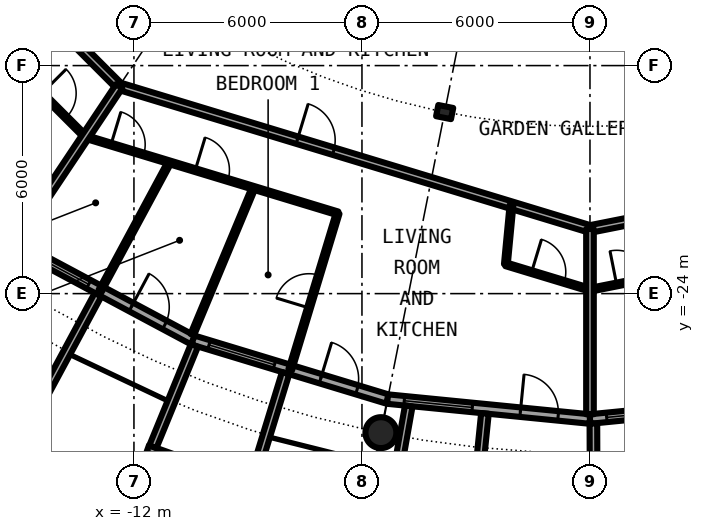
"""IFC4 building model, lengths in metres.
Left out: names, types, materials, properties, quantities, classifications, styles, units other than length and angle.
Written with IfcOpenShell. Run it as: python <this file> out.ifc"""

import sys

from ifc_helpers import new_model, si_unit, direction, frame, frame_2d, origin, origin_2d, place, context, subcontext, project, spatial, rectangle, circle, hollow_circle, i_section, extrude, element, fill, save


model = new_model("IFC4")
c1 = context("Model", 3, precision=1e-05, world=origin(), true_north=direction((0.0, 1.0)))
c2 = subcontext(c1, "Body", "Model", "MODEL_VIEW")
j1 = project(units=[si_unit("LENGTHUNIT", "METRE"), si_unit("PLANEANGLEUNIT", "RADIAN")], contexts=[c1])
p1 = place(None, origin())
s1 = spatial("IfcSite", under=j1, at=p1, CompositionType="ELEMENT")
p2 = place(p1, origin())
s2 = spatial("IfcBuilding", under=s1, at=p2, CompositionType="ELEMENT")
p3 = place(p2, frame((0.0, 0.0, 199.35)))
s3 = spatial("IfcBuildingStorey", under=s2, at=p3, CompositionType="ELEMENT", Elevation=199.35)
p4 = place(p3, frame((-5.501, -27.658, 0.0), z_axis=(0.0, 0.0, 1.0), x_axis=(1.0, 0.0, 0.0)))
e1 = element("IfcColumn", 1, at=p4, inside=s3, PredefinedType="COLUMN", context=c2, shape_type="SweptSolid", body=[
    extrude(hollow_circle(Radius=0.406, WallThickness=0.03, at=origin_2d()), origin(), (0.0, 0.0, 1.0), 3.05),
])
p5 = place(p3, frame((-3.824, -19.223, 0.0), z_axis=(0.0, 0.0, 1.0), x_axis=(-0.195090322016, -0.980785280403, 0.0)))
e2 = element("IfcColumn", 2, at=p5, inside=s3, PredefinedType="COLUMN", context=c2, shape_type="SweptSolid", body=[
    extrude(i_section(OverallWidth=0.3, OverallDepth=0.4, WebThickness=0.013, FlangeThickness=0.024, FilletRadius=0.027, at=origin_2d()), origin(), (0.0, 0.0, 1.0), 3.05),
])
p6 = place(p3, frame((-15.167, -22.699, 0.0), z_axis=(0.0, 0.0, 1.0), x_axis=(0.881915646801, -0.471407246368, 0.0)))
e3 = element("IfcWall", 3, at=p6, inside=s3, PredefinedType="SOLIDWALL", context=c2, shape_type="SweptSolid", body=[
    extrude(rectangle(XDim=5.352, YDim=0.25, at=frame_2d((2.676, 0.0))), origin(), (0.0, 0.0, 1.0), 2.7),
])
p7 = place(p6, frame((0.441, 0.0, 0.3)))
e4 = element("IfcOpeningElement", 4, at=p7, cuts=e3, PredefinedType="OPENING", context=c2, shape_type="SweptSolid", body=[
    extrude(rectangle(XDim=1.8, YDim=2.1, at=frame_2d((0.9, 1.05))), frame((0.0, 0.135, 0.0), z_axis=(0.0, -1.0, 0.0), x_axis=(1.0, 0.0, 0.0)), (0.0, 0.0, 1.0), 0.27),
])
p8 = place(p6, frame((3.51, 0.0, 0.0)))
e5 = element("IfcOpeningElement", 5, at=p8, cuts=e3, PredefinedType="OPENING", context=c2, shape_type="SweptSolid", body=[
    extrude(rectangle(XDim=1.0, YDim=2.2, at=frame_2d((0.5, 1.1))), frame((0.0, 0.135, 0.0), z_axis=(0.0, -1.0, 0.0), x_axis=(1.0, 0.0, 0.0)), (0.0, 0.0, 1.0), 0.27),
])
p9 = place(p3, frame((-12.945, -24.029, -0.03), z_axis=(0.0, 0.0, 1.0), x_axis=(-0.474424310775, -0.88029629861, 0.0)))
e6 = element("IfcWall", 6, at=p9, inside=s3, PredefinedType="SOLIDWALL", context=c2, shape_type="SweptSolid", body=[
    extrude(rectangle(XDim=3.006, YDim=0.2, at=frame_2d((1.503, 0.0))), origin(), (0.0, 0.0, 1.0), 2.73),
])
p10 = place(p3, frame((-10.447, -25.222, 0.0), z_axis=(0.0, 0.0, 1.0), x_axis=(0.956965678721, -0.290201119486, 0.0)))
e7 = element("IfcWall", 7, at=p10, inside=s3, PredefinedType="SOLIDWALL", context=c2, shape_type="SweptSolid", body=[
    extrude(rectangle(XDim=5.351, YDim=0.25, at=frame_2d((2.676, 0.0))), origin(), (0.0, 0.0, 1.0), 2.7),
])
p11 = place(p10, frame((0.441, 0.0, 0.3)))
e8 = element("IfcOpeningElement", 8, at=p11, cuts=e7, PredefinedType="OPENING", context=c2, shape_type="SweptSolid", body=[
    extrude(rectangle(XDim=1.8, YDim=2.1, at=frame_2d((0.9, 1.05))), frame((0.0, 0.135, 0.0), z_axis=(0.0, -1.0, 0.0), x_axis=(1.0, 0.0, 0.0)), (0.0, 0.0, 1.0), 0.27),
])
p12 = place(p10, frame((3.51, 0.0, 0.0)))
e9 = element("IfcOpeningElement", 9, at=p12, cuts=e7, PredefinedType="OPENING", context=c2, shape_type="SweptSolid", body=[
    extrude(rectangle(XDim=1.0, YDim=2.2, at=frame_2d((0.5, 1.1))), frame((0.0, 0.135, 0.0), z_axis=(0.0, -1.0, 0.0), x_axis=(1.0, 0.0, 0.0)), (0.0, 0.0, 1.0), 0.27),
])
p13 = place(p3, frame((-11.638, -28.084, -0.03), z_axis=(0.0, 0.0, 1.0), x_axis=(0.941461077774, -0.337121697664, 0.0)))
e10 = element("IfcWall", 10, at=p13, inside=s3, PredefinedType="SOLIDWALL", context=c2, shape_type="SweptSolid", body=[
    extrude(rectangle(XDim=2.993, YDim=0.2, at=frame_2d((1.497, 0.0))), origin(), (0.0, 0.0, 1.0), 2.73),
])
p14 = place(p13, frame((0.457, 0.0, 0.33)))
e11 = element("IfcOpeningElement", 11, at=p14, cuts=e10, PredefinedType="OPENING", context=c2, shape_type="SweptSolid", body=[
    extrude(circle(Radius=1.04, at=frame_2d((1.04, 1.04))), frame((0.0, 0.11, 0.0), z_axis=(0.0, -1.0, 0.0), x_axis=(1.0, 0.0, 0.0)), (0.0, 0.0, 1.0), 0.22),
])
p15 = place(p3, frame((-10.409, -25.364, -0.03), z_axis=(0.0, 0.0, 1.0), x_axis=(-0.379509886562, -0.925187681501, 0.0)))
e12 = element("IfcWall", 12, at=p15, inside=s3, PredefinedType="SOLIDWALL", context=c2, shape_type="SweptSolid", body=[
    extrude(rectangle(XDim=2.883, YDim=0.2, at=frame_2d((1.441, 0.0))), origin(), (0.0, 0.0, 1.0), 2.73),
])
p16 = place(p3, frame((-8.009, -26.092, -0.03), z_axis=(0.0, 0.0, 1.0), x_axis=(-0.293406695073, -0.955987715029, 0.0)))
e13 = element("IfcWall", 13, at=p16, inside=s3, PredefinedType="SOLIDWALL", context=c2, shape_type="SweptSolid", body=[
    extrude(rectangle(XDim=3.006, YDim=0.2, at=frame_2d((1.503, 0.0))), origin(), (0.0, 0.0, 1.0), 2.73),
])
p17 = place(p3, frame((-5.326, -26.775, 0.0), z_axis=(0.0, 0.0, 1.0), x_axis=(0.995173996315, -0.098126026407, 0.0)))
e14 = element("IfcWall", 14, at=p17, inside=s3, PredefinedType="SOLIDWALL", context=c2, shape_type="SweptSolid", body=[
    extrude(rectangle(XDim=5.352, YDim=0.25, at=frame_2d((2.676, 0.0))), origin(), (0.0, 0.0, 1.0), 2.7),
])
p18 = place(p17, frame((0.441, 0.0, 0.3)))
e15 = element("IfcOpeningElement", 15, at=p18, cuts=e14, PredefinedType="OPENING", context=c2, shape_type="SweptSolid", body=[
    extrude(rectangle(XDim=1.8, YDim=2.1, at=frame_2d((0.9, 1.05))), frame((0.0, 0.135, 0.0), z_axis=(0.0, -1.0, 0.0), x_axis=(1.0, 0.0, 0.0)), (0.0, 0.0, 1.0), 0.27),
])
p19 = place(p17, frame((3.51, 0.0, 0.0)))
e16 = element("IfcOpeningElement", 16, at=p19, cuts=e14, PredefinedType="OPENING", context=c2, shape_type="SweptSolid", body=[
    extrude(rectangle(XDim=1.0, YDim=2.2, at=frame_2d((0.5, 1.1))), frame((0.0, 0.135, 0.0), z_axis=(0.0, -1.0, 0.0), x_axis=(1.0, 0.0, 0.0)), (0.0, 0.0, 1.0), 0.27),
])
p20 = place(p3, frame((-4.769, -26.956, -0.03), z_axis=(0.0, 0.0, 1.0), x_axis=(-0.174056778901, -0.984735618183, 0.0)))
e17 = element("IfcWall", 17, at=p20, inside=s3, PredefinedType="SOLIDWALL", context=c2, shape_type="SweptSolid", body=[
    extrude(rectangle(XDim=2.925, YDim=0.2, at=frame_2d((1.462, 0.0))), origin(), (0.0, 0.0, 1.0), 2.73),
])
p21 = place(p3, frame((-2.764, -27.153, -0.03), z_axis=(0.0, 0.0, 1.0), x_axis=(-0.101505487237, -0.994834979311, 0.0)))
e18 = element("IfcWall", 18, at=p21, inside=s3, PredefinedType="SOLIDWALL", context=c2, shape_type="SweptSolid", body=[
    extrude(rectangle(XDim=3.007, YDim=0.2, at=frame_2d((1.503, 0.0))), origin(), (0.0, 0.0, 1.0), 2.73),
])
p22 = place(p3, frame((0.0, -27.3, 0.0), z_axis=(0.0, 0.0, 1.0), x_axis=(0.995173996315, 0.098126026407, 0.0)))
e19 = element("IfcWall", 19, at=p22, inside=s3, PredefinedType="SOLIDWALL", context=c2, shape_type="SweptSolid", body=[
    extrude(rectangle(XDim=5.352, YDim=0.25, at=frame_2d((2.676, 0.0))), origin(), (0.0, 0.0, 1.0), 2.7),
])
p23 = place(p22, frame((0.441, 0.0, 0.3)))
e20 = element("IfcOpeningElement", 20, at=p23, cuts=e19, PredefinedType="OPENING", context=c2, shape_type="SweptSolid", body=[
    extrude(rectangle(XDim=1.8, YDim=2.1, at=frame_2d((0.9, 1.05))), frame((0.0, 0.135, 0.0), z_axis=(0.0, -1.0, 0.0), x_axis=(1.0, 0.0, 0.0)), (0.0, 0.0, 1.0), 0.27),
])
p24 = place(p22, frame((3.51, 0.0, 0.0)))
e21 = element("IfcOpeningElement", 21, at=p24, cuts=e19, PredefinedType="OPENING", context=c2, shape_type="SweptSolid", body=[
    extrude(rectangle(XDim=1.0, YDim=2.2, at=frame_2d((0.5, 1.1))), frame((0.0, 0.135, 0.0), z_axis=(0.0, -1.0, 0.0), x_axis=(1.0, 0.0, 0.0)), (0.0, 0.0, 1.0), 0.27),
])
p25 = place(p3, frame((0.09, -27.417, -0.03), z_axis=(0.0, 0.0, 1.0), x_axis=(0.00347308367, -0.999993968827, 0.0)))
e22 = element("IfcWall", 22, at=p25, inside=s3, PredefinedType="SOLIDWALL", context=c2, shape_type="SweptSolid", body=[
    extrude(rectangle(XDim=2.882, YDim=0.2, at=frame_2d((1.441, 0.0))), origin(), (0.0, 0.0, 1.0), 2.73),
])
p26 = place(p3, frame((-14.927, -18.224, 0.0), z_axis=(0.0, 0.0, 1.0), x_axis=(0.707316201218, -0.706897299114, 0.0)))
e23 = element("IfcWall", 23, at=p26, inside=s3, PredefinedType="PARTITIONING", context=c2, shape_type="SweptSolid", body=[
    extrude(rectangle(XDim=2.331, YDim=0.1, at=frame_2d((1.166, 0.0))), origin(), (0.0, 0.0, 1.0), 2.7),
])
p27 = place(p26, frame((0.716, 0.0, 0.0)))
e24 = element("IfcOpeningElement", 24, at=p27, cuts=e23, PredefinedType="OPENING", context=c2, shape_type="SweptSolid", body=[
    extrude(rectangle(XDim=0.9, YDim=2.3, at=frame_2d((0.45, 1.15))), frame((0.0, 0.06, 0.0), z_axis=(0.0, -1.0, 0.0), x_axis=(1.0, 0.0, 0.0)), (0.0, 0.0, 1.0), 0.12),
])
p28 = place(p3, frame((0.0, -23.9, 0.0), z_axis=(0.0, 0.0, 1.0), x_axis=(0.98079351414, 0.19504892366, 0.0)))
e25 = element("IfcWall", 25, at=p28, inside=s3, PredefinedType="PARTITIONING", context=c2, shape_type="SweptSolid", body=[
    extrude(rectangle(XDim=2.332, YDim=0.1, at=frame_2d((1.166, 0.0))), origin(), (0.0, 0.0, 1.0), 2.7),
])
p29 = place(p28, frame((0.716, 0.0, 0.0)))
e26 = element("IfcOpeningElement", 26, at=p29, cuts=e25, PredefinedType="OPENING", context=c2, shape_type="SweptSolid", body=[
    extrude(rectangle(XDim=0.9, YDim=2.3, at=frame_2d((0.45, 1.15))), frame((0.0, 0.06, 0.0), z_axis=(0.0, -1.0, 0.0), x_axis=(1.0, 0.0, 0.0)), (0.0, 0.0, 1.0), 0.12),
])
p30 = place(p3, frame((-13.279, -19.874, 0.0), z_axis=(0.0, 0.0, 1.0), x_axis=(0.956989789119, -0.290121601266, 0.0)))
e27 = element("IfcWall", 27, at=p30, inside=s3, PredefinedType="PARTITIONING", context=c2, shape_type="SweptSolid", body=[
    extrude(rectangle(XDim=6.942, YDim=0.1, at=frame_2d((3.471, 0.0))), origin(), (0.0, 0.0, 1.0), 2.7),
])
p31 = place(p30, frame((3.022, 0.0, 0.0)))
e28 = element("IfcOpeningElement", 28, at=p31, cuts=e27, PredefinedType="OPENING", context=c2, shape_type="SweptSolid", body=[
    extrude(rectangle(XDim=0.9, YDim=2.3, at=frame_2d((0.45, 1.15))), frame((0.0, 0.06, 0.0), z_axis=(0.0, -1.0, 0.0), x_axis=(1.0, 0.0, 0.0)), (0.0, 0.0, 1.0), 0.12),
])
p32 = place(p30, frame((0.705, 0.0, 0.0)))
e29 = element("IfcOpeningElement", 29, at=p32, cuts=e27, PredefinedType="OPENING", context=c2, shape_type="SweptSolid", body=[
    extrude(rectangle(XDim=0.9, YDim=2.3, at=frame_2d((0.45, 1.15))), frame((0.0, 0.06, 0.0), z_axis=(0.0, -1.0, 0.0), x_axis=(1.0, 0.0, 0.0)), (0.0, 0.0, 1.0), 0.12),
])
p33 = place(p3, frame((-2.213, -23.229, 0.0), z_axis=(0.0, 0.0, 1.0), x_axis=(0.957056340114, -0.289901986622, 0.0)))
e30 = element("IfcWall", 30, at=p33, inside=s3, PredefinedType="PARTITIONING", context=c2, shape_type="SweptSolid", body=[
    extrude(rectangle(XDim=2.314, YDim=0.1, at=frame_2d((1.157, 0.0))), origin(), (0.0, 0.0, 1.0), 2.7),
])
p34 = place(p33, frame((0.707, 0.0, 0.0)))
e31 = element("IfcOpeningElement", 31, at=p34, cuts=e30, PredefinedType="OPENING", context=c2, shape_type="SweptSolid", body=[
    extrude(rectangle(XDim=0.9, YDim=2.3, at=frame_2d((0.45, 1.15))), frame((0.0, 0.06, 0.0), z_axis=(0.0, -1.0, 0.0), x_axis=(1.0, 0.0, 0.0)), (0.0, 0.0, 1.0), 0.12),
])
p35 = place(p3, frame((-18.542, -12.389, 0.0), z_axis=(0.0, 0.0, 1.0), x_axis=(0.707106781187, -0.707106781187, 0.0)))
e32 = element("IfcWall", 32, at=p35, inside=s3, PredefinedType="PARTITIONING", context=c2, shape_type="SweptSolid", body=[
    extrude(rectangle(XDim=8.702, YDim=0.2, at=frame_2d((4.351, 0.0))), origin(), (0.0, 0.0, 1.0), 2.7),
])
p36 = place(p35, frame((2.763, 0.0, 0.0)))
e33 = element("IfcOpeningElement", 33, at=p36, cuts=e32, PredefinedType="OPENING", context=c2, shape_type="SweptSolid", body=[
    extrude(rectangle(XDim=1.0, YDim=2.3, at=frame_2d((0.5, 1.15))), frame((0.0, 0.11, 0.0), z_axis=(0.0, -1.0, 0.0), x_axis=(1.0, 0.0, 0.0)), (0.0, 0.0, 1.0), 0.22),
])
p37 = place(p3, frame((0.0, -22.3, 0.0), z_axis=(0.0, 0.0, 1.0), x_axis=(0.980813117615, 0.194950322682, 0.0)))
e34 = element("IfcWall", 34, at=p37, inside=s3, PredefinedType="PARTITIONING", context=c2, shape_type="SweptSolid", body=[
    extrude(rectangle(XDim=8.7, YDim=0.2, at=frame_2d((4.35, 0.0))), origin(), (0.0, 0.0, 1.0), 2.7),
])
p38 = place(p37, frame((4.938, 0.0, 0.0)))
e35 = element("IfcOpeningElement", 35, at=p38, cuts=e34, PredefinedType="OPENING", context=c2, shape_type="SweptSolid", body=[
    extrude(rectangle(XDim=1.0, YDim=2.3, at=frame_2d((0.5, 1.15))), frame((0.0, 0.11, 0.0), z_axis=(0.0, -1.0, 0.0), x_axis=(1.0, 0.0, 0.0)), (0.0, 0.0, 1.0), 0.22),
])
p39 = place(p3, frame((-12.389, -18.542, 0.0), z_axis=(0.0, 0.0, 1.0), x_axis=(0.956942051091, -0.290279022415, 0.0)))
e36 = element("IfcWall", 36, at=p39, inside=s3, PredefinedType="PARTITIONING", context=c2, shape_type="SweptSolid", body=[
    extrude(rectangle(XDim=12.946, YDim=0.2, at=frame_2d((6.473, 0.0))), origin(), (0.0, 0.0, 1.0), 2.7),
])
p40 = place(p39, frame((4.895, 0.0, 0.0)))
e37 = element("IfcOpeningElement", 37, at=p40, cuts=e36, PredefinedType="OPENING", context=c2, shape_type="SweptSolid", body=[
    extrude(rectangle(XDim=1.0, YDim=2.3, at=frame_2d((0.5, 1.15))), frame((0.0, 0.11, 0.0), z_axis=(0.0, -1.0, 0.0), x_axis=(1.0, 0.0, 0.0)), (0.0, 0.0, 1.0), 0.22),
])
p41 = place(p3, frame((-14.927, -18.224, 0.0), z_axis=(0.0, 0.0, 1.0), x_axis=(0.633861186344, 0.773446828454, 0.0)))
e38 = element("IfcWall", 38, at=p41, inside=s3, PredefinedType="PARTITIONING", context=c2, shape_type="SweptSolid", body=[
    extrude(rectangle(XDim=1.578, YDim=0.1, at=frame_2d((0.789, 0.0))), origin(), (0.0, 0.0, 1.0), 2.7),
])
p42 = place(p3, frame((-15.096, -22.596, 0.0), z_axis=(0.0, 0.0, 1.0), x_axis=(0.55555521993, 0.831479643532, 0.0)))
e39 = element("IfcWall", 39, at=p42, inside=s3, PredefinedType="PARTITIONING", context=c2, shape_type="SweptSolid", body=[
    extrude(rectangle(XDim=4.875, YDim=0.2, at=frame_2d((2.437, 0.0))), origin(), (0.0, 0.0, 1.0), 2.7),
])
p43 = place(p3, frame((-12.887, -23.925, 0.0), z_axis=(0.0, 0.0, 1.0), x_axis=(0.474281720599, 0.88037313084, 0.0)))
e40 = element("IfcWall", 40, at=p43, inside=s3, PredefinedType="PARTITIONING", context=c2, shape_type="SweptSolid", body=[
    extrude(rectangle(XDim=3.842, YDim=0.1, at=frame_2d((1.921, 0.0))), origin(), (0.0, 0.0, 1.0), 2.7),
])
p44 = place(p3, frame((-10.465, -25.079, 0.0), z_axis=(0.0, 0.0, 1.0), x_axis=(0.385232176411, 0.922819684585, 0.0)))
e41 = element("IfcWall", 41, at=p44, inside=s3, PredefinedType="PARTITIONING", context=c2, shape_type="SweptSolid", body=[
    extrude(rectangle(XDim=4.187, YDim=0.1, at=frame_2d((2.094, 0.0))), origin(), (0.0, 0.0, 1.0), 2.7),
])
p45 = place(p3, frame((-7.888, -26.005, 0.0), z_axis=(0.0, 0.0, 1.0), x_axis=(0.290193157742, 0.956968093094, 0.0)))
e42 = element("IfcWall", 42, at=p45, inside=s3, PredefinedType="PARTITIONING", context=c2, shape_type="SweptSolid", body=[
    extrude(rectangle(XDim=4.304, YDim=0.1, at=frame_2d((2.152, 0.0))), origin(), (0.0, 0.0, 1.0), 2.7),
])
p46 = place(p45, frame((1.702, 0.0, 0.0)))
e43 = element("IfcOpeningElement", 43, at=p46, cuts=e42, PredefinedType="OPENING", context=c2, shape_type="SweptSolid", body=[
    extrude(rectangle(XDim=0.9, YDim=2.3, at=frame_2d((0.45, 1.15))), frame((0.0, 0.06, 0.0), z_axis=(0.0, -1.0, 0.0), x_axis=(1.0, 0.0, 0.0)), (0.0, 0.0, 1.0), 0.12),
])
p47 = place(p3, frame((-2.213, -23.229, 0.0), z_axis=(0.0, 0.0, 1.0), x_axis=(0.094720578196, 0.995503898569, 0.0)))
e44 = element("IfcWall", 44, at=p47, inside=s3, PredefinedType="PARTITIONING", context=c2, shape_type="SweptSolid", body=[
    extrude(rectangle(XDim=1.562, YDim=0.1, at=frame_2d((0.781, 0.0))), origin(), (0.0, 0.0, 1.0), 2.7),
])
p48 = place(p3, frame((0.0, -27.175, 0.0), z_axis=(0.0, 0.0, 1.0), x_axis=(0.0, 1.0, 0.0)))
e45 = element("IfcWall", 45, at=p48, inside=s3, PredefinedType="PARTITIONING", context=c2, shape_type="SweptSolid", body=[
    extrude(rectangle(XDim=4.875, YDim=0.2, at=frame_2d((2.438, 0.0))), origin(), (0.0, 0.0, 1.0), 2.7),
])
p49 = place(p7, origin())
e46 = element("IfcWindow", 46, at=p49, inside=s3, PartitioningType="SINGLE_PANEL", PredefinedType="WINDOW", context=c2, shape_type="SweptSolid", body=[
    extrude(rectangle(XDim=1.8, YDim=2.1, at=frame_2d((0.9, 1.05))), frame((0.0, 0.03, 0.0), z_axis=(0.0, -1.0, 0.0), x_axis=(1.0, 0.0, 0.0)), (0.0, 0.0, 1.0), 0.06),
])
fill(e4, e46)
p50 = place(p8, origin())
e47 = element("IfcDoor", 47, at=p50, inside=s3, OperationType="SINGLE_SWING_LEFT", PredefinedType="DOOR", context=c2, shape_type="SweptSolid", body=[
    extrude(rectangle(XDim=1.0, YDim=2.2, at=frame_2d((0.5, 1.1))), frame((0.0, 0.025, 0.0), z_axis=(0.0, -1.0, 0.0), x_axis=(1.0, 0.0, 0.0)), (0.0, 0.0, 1.0), 0.05),
])
fill(e5, e47)
p51 = place(p11, origin())
e48 = element("IfcWindow", 48, at=p51, inside=s3, PartitioningType="SINGLE_PANEL", PredefinedType="WINDOW", context=c2, shape_type="SweptSolid", body=[
    extrude(rectangle(XDim=1.8, YDim=2.1, at=frame_2d((0.9, 1.05))), frame((0.0, 0.03, 0.0), z_axis=(0.0, -1.0, 0.0), x_axis=(1.0, 0.0, 0.0)), (0.0, 0.0, 1.0), 0.06),
])
fill(e8, e48)
p52 = place(p12, origin())
e49 = element("IfcDoor", 49, at=p52, inside=s3, OperationType="SINGLE_SWING_LEFT", PredefinedType="DOOR", context=c2, shape_type="SweptSolid", body=[
    extrude(rectangle(XDim=1.0, YDim=2.2, at=frame_2d((0.5, 1.1))), frame((0.0, 0.025, 0.0), z_axis=(0.0, -1.0, 0.0), x_axis=(1.0, 0.0, 0.0)), (0.0, 0.0, 1.0), 0.05),
])
fill(e9, e49)
p53 = place(p18, origin())
e50 = element("IfcWindow", 50, at=p53, inside=s3, PartitioningType="SINGLE_PANEL", PredefinedType="WINDOW", context=c2, shape_type="SweptSolid", body=[
    extrude(rectangle(XDim=1.8, YDim=2.1, at=frame_2d((0.9, 1.05))), frame((0.0, 0.03, 0.0), z_axis=(0.0, -1.0, 0.0), x_axis=(1.0, 0.0, 0.0)), (0.0, 0.0, 1.0), 0.06),
])
fill(e15, e50)
p54 = place(p19, origin())
e51 = element("IfcDoor", 51, at=p54, inside=s3, OperationType="SINGLE_SWING_LEFT", PredefinedType="DOOR", context=c2, shape_type="SweptSolid", body=[
    extrude(rectangle(XDim=1.0, YDim=2.2, at=frame_2d((0.5, 1.1))), frame((0.0, 0.025, 0.0), z_axis=(0.0, -1.0, 0.0), x_axis=(1.0, 0.0, 0.0)), (0.0, 0.0, 1.0), 0.05),
])
fill(e16, e51)
p55 = place(p23, origin())
e52 = element("IfcWindow", 52, at=p55, inside=s3, PartitioningType="SINGLE_PANEL", PredefinedType="WINDOW", context=c2, shape_type="SweptSolid", body=[
    extrude(rectangle(XDim=1.8, YDim=2.1, at=frame_2d((0.9, 1.05))), frame((0.0, 0.03, 0.0), z_axis=(0.0, -1.0, 0.0), x_axis=(1.0, 0.0, 0.0)), (0.0, 0.0, 1.0), 0.06),
])
fill(e20, e52)
p56 = place(p27, origin())
e53 = element("IfcDoor", 53, at=p56, inside=s3, OperationType="SINGLE_SWING_LEFT", PredefinedType="DOOR", context=c2, shape_type="SweptSolid", body=[
    extrude(rectangle(XDim=0.9, YDim=2.3, at=frame_2d((0.45, 1.15))), frame((0.0, 0.025, 0.0), z_axis=(0.0, -1.0, 0.0), x_axis=(1.0, 0.0, 0.0)), (0.0, 0.0, 1.0), 0.05),
])
fill(e24, e53)
p57 = place(p40, origin())
e54 = element("IfcDoor", 54, at=p57, inside=s3, OperationType="SINGLE_SWING_LEFT", PredefinedType="DOOR", context=c2, shape_type="SweptSolid", body=[
    extrude(rectangle(XDim=1.0, YDim=2.3, at=frame_2d((0.5, 1.15))), frame((0.0, 0.025, 0.0), z_axis=(0.0, -1.0, 0.0), x_axis=(1.0, 0.0, 0.0)), (0.0, 0.0, 1.0), 0.05),
])
fill(e37, e54)
p58 = place(p34, origin())
e55 = element("IfcDoor", 55, at=p58, inside=s3, OperationType="SINGLE_SWING_LEFT", PredefinedType="DOOR", context=c2, shape_type="SweptSolid", body=[
    extrude(rectangle(XDim=0.9, YDim=2.3, at=frame_2d((0.45, 1.15))), frame((0.0, 0.025, 0.0), z_axis=(0.0, -1.0, 0.0), x_axis=(1.0, 0.0, 0.0)), (0.0, 0.0, 1.0), 0.05),
])
fill(e31, e55)
p59 = place(p46, origin())
e56 = element("IfcDoor", 56, at=p59, inside=s3, OperationType="SINGLE_SWING_LEFT", PredefinedType="DOOR", context=c2, shape_type="SweptSolid", body=[
    extrude(rectangle(XDim=0.9, YDim=2.3, at=frame_2d((0.45, 1.15))), frame((0.0, 0.025, 0.0), z_axis=(0.0, -1.0, 0.0), x_axis=(1.0, 0.0, 0.0)), (0.0, 0.0, 1.0), 0.05),
])
fill(e43, e56)
p60 = place(p31, origin())
e57 = element("IfcDoor", 57, at=p60, inside=s3, OperationType="SINGLE_SWING_RIGHT", PredefinedType="DOOR", context=c2, shape_type="SweptSolid", body=[
    extrude(rectangle(XDim=0.9, YDim=2.3, at=frame_2d((0.45, 1.15))), frame((0.0, 0.025, 0.0), z_axis=(0.0, -1.0, 0.0), x_axis=(1.0, 0.0, 0.0)), (0.0, 0.0, 1.0), 0.05),
])
fill(e28, e57)
p61 = place(p32, origin())
e58 = element("IfcDoor", 58, at=p61, inside=s3, OperationType="SINGLE_SWING_LEFT", PredefinedType="DOOR", context=c2, shape_type="SweptSolid", body=[
    extrude(rectangle(XDim=0.9, YDim=2.3, at=frame_2d((0.45, 1.15))), frame((0.0, 0.025, 0.0), z_axis=(0.0, -1.0, 0.0), x_axis=(1.0, 0.0, 0.0)), (0.0, 0.0, 1.0), 0.05),
])
fill(e29, e58)
p62 = place(p29, origin())
e59 = element("IfcDoor", 59, at=p62, inside=s3, OperationType="SINGLE_SWING_LEFT", PredefinedType="DOOR", context=c2, shape_type="SweptSolid", body=[
    extrude(rectangle(XDim=0.9, YDim=2.3, at=frame_2d((0.45, 1.15))), frame((0.0, 0.025, 0.0), z_axis=(0.0, -1.0, 0.0), x_axis=(1.0, 0.0, 0.0)), (0.0, 0.0, 1.0), 0.05),
])
fill(e26, e59)
save(model, sys.argv[1])
